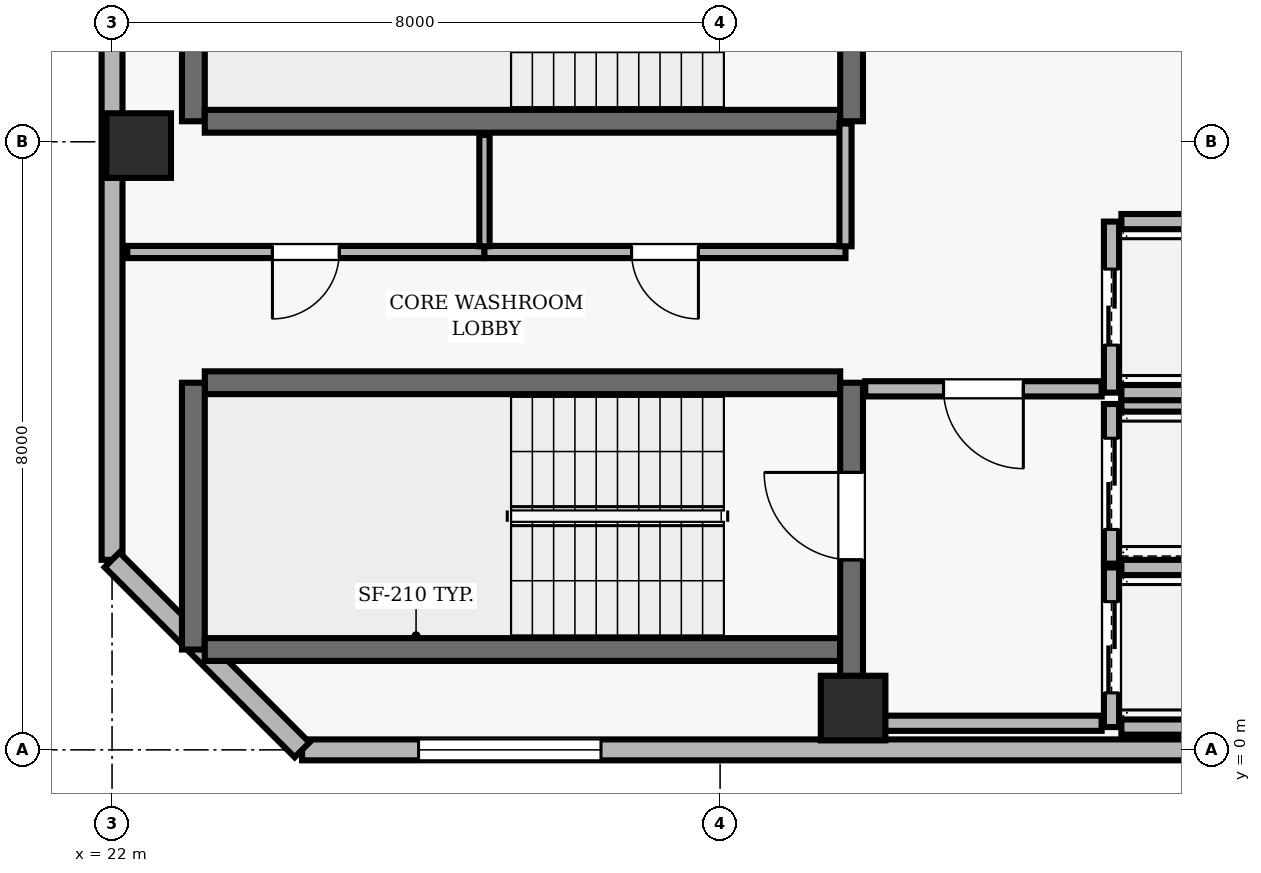
"""IFC4 building model, lengths in metres.
Left out: names, types, materials, properties, quantities, classifications, styles, units other than length and angle.
Written with IfcOpenShell. Run it as: python <this file> out.ifc"""

import sys

from ifc_helpers import new_model, si_unit, direction, frame, frame_2d, origin, origin_2d, place, context, subcontext, project, spatial, rectangle, extrude, element, fill, save


model = new_model("IFC4")
c1 = context("Model", 3, precision=1e-05, world=origin(), true_north=direction((0.0, 1.0)))
c2 = subcontext(c1, "Body", "Model", "MODEL_VIEW")
j1 = project(units=[si_unit("LENGTHUNIT", "METRE"), si_unit("PLANEANGLEUNIT", "RADIAN")], contexts=[c1])
p1 = place(None, origin())
s1 = spatial("IfcSite", under=j1, at=p1, CompositionType="ELEMENT")
p2 = place(p1, origin())
s2 = spatial("IfcBuilding", under=s1, at=p2, CompositionType="ELEMENT")
p3 = place(p2, frame((0.0, 0.0, 287.2)))
s3 = spatial("IfcBuildingStorey", under=s2, at=p3, CompositionType="ELEMENT", Elevation=287.2)
for number, where, z_axis, x_axis in (
    (1, (31.75, 0.55, 0.0), (0.0, 0.0, 1.0), (1.0, 0.0, 0.0)),
    (2, (22.35, 7.95, 0.0), (0.0, 0.0, 1.0), (1.0, 0.0, 0.0)),
):
    element("IfcColumn", number, at=place(p3, frame(where, z_axis=z_axis, x_axis=x_axis)), inside=s3, PredefinedType="COLUMN", context=c2, shape_type="SweptSolid", body=[
        extrude(rectangle(XDim=0.85, YDim=0.85, at=origin_2d()), origin(), (0.0, 0.0, 1.0), 3.9),
    ])
p4 = place(p3, frame((24.5, 0.0, 0.0), z_axis=(0.0, 0.0, 1.0), x_axis=(1.0, 0.0, 0.0)))
e3 = element("IfcWall", 3, at=p4, inside=s3, PredefinedType="SOLIDWALL", context=c2, shape_type="SweptSolid", body=[
    extrude(rectangle(XDim=32.8, YDim=0.275, at=frame_2d((16.4, 0.0))), origin(), (0.0, 0.0, 1.0), 3.69),
])
p5 = place(p4, frame((1.533, 0.0, 0.9)))
e4 = element("IfcOpeningElement", 4, at=p5, cuts=e3, PredefinedType="OPENING", context=c2, shape_type="SweptSolid", body=[
    extrude(rectangle(XDim=2.4, YDim=2.2, at=frame_2d((1.2, 1.1))), frame((0.0, 0.147, 0.0), z_axis=(0.0, -1.0, 0.0), x_axis=(1.0, 0.0, 0.0)), (0.0, 0.0, 1.0), 0.295),
])
p6 = place(p3, frame((22.0, 35.3, 0.0), z_axis=(0.0, 0.0, 1.0), x_axis=(0.0, -1.0, 0.0)))
e5 = element("IfcWall", 5, at=p6, inside=s3, PredefinedType="SOLIDWALL", context=c2, shape_type="SweptSolid", body=[
    extrude(rectangle(XDim=32.8, YDim=0.275, at=frame_2d((16.4, 0.0))), origin(), (0.0, 0.0, 1.0), 3.69),
])
p7 = place(p6, frame((7.3, 0.0, 0.0)))
e6 = element("IfcOpeningElement", 6, at=p7, cuts=e5, PredefinedType="OPENING", context=c2, shape_type="SweptSolid", body=[
    extrude(rectangle(XDim=1.0, YDim=2.2, at=frame_2d((0.5, 1.1))), frame((0.0, 0.147, 0.0), z_axis=(0.0, -1.0, 0.0), x_axis=(1.0, 0.0, 0.0)), (0.0, 0.0, 1.0), 0.295),
])
p8 = place(p6, frame((1.533, 0.0, 0.9)))
e7 = element("IfcOpeningElement", 7, at=p8, cuts=e5, PredefinedType="OPENING", context=c2, shape_type="SweptSolid", body=[
    extrude(rectangle(XDim=2.4, YDim=2.2, at=frame_2d((1.2, 1.1))), frame((0.0, 0.147, 0.0), z_axis=(0.0, -1.0, 0.0), x_axis=(1.0, 0.0, 0.0)), (0.0, 0.0, 1.0), 0.295),
])
p9 = place(p6, frame((12.917, 0.0, 0.9)))
e8 = element("IfcOpeningElement", 8, at=p9, cuts=e5, PredefinedType="OPENING", context=c2, shape_type="SweptSolid", body=[
    extrude(rectangle(XDim=2.4, YDim=2.2, at=frame_2d((1.2, 1.1))), frame((0.0, 0.147, 0.0), z_axis=(0.0, -1.0, 0.0), x_axis=(1.0, 0.0, 0.0)), (0.0, 0.0, 1.0), 0.295),
])
p10 = place(p6, frame((17.483, 0.0, 0.9)))
e9 = element("IfcOpeningElement", 9, at=p10, cuts=e5, PredefinedType="OPENING", context=c2, shape_type="SweptSolid", body=[
    extrude(rectangle(XDim=2.4, YDim=2.2, at=frame_2d((1.2, 1.1))), frame((0.0, 0.147, 0.0), z_axis=(0.0, -1.0, 0.0), x_axis=(1.0, 0.0, 0.0)), (0.0, 0.0, 1.0), 0.295),
])
p11 = place(p6, frame((23.4, 0.0, 0.9)))
e10 = element("IfcOpeningElement", 10, at=p11, cuts=e5, PredefinedType="OPENING", context=c2, shape_type="SweptSolid", body=[
    extrude(rectangle(XDim=2.4, YDim=2.2, at=frame_2d((1.2, 1.1))), frame((0.0, 0.147, 0.0), z_axis=(0.0, -1.0, 0.0), x_axis=(1.0, 0.0, 0.0)), (0.0, 0.0, 1.0), 0.295),
])
p12 = place(p3, frame((22.0, 2.5, 0.0), z_axis=(0.0, 0.0, 1.0), x_axis=(0.707106781187, -0.707106781187, 0.0)))
e11 = element("IfcWall", 11, at=p12, inside=s3, PredefinedType="SOLIDWALL", context=c2, shape_type="SweptSolid", body=[
    extrude(rectangle(XDim=3.536, YDim=0.275, at=frame_2d((1.768, 0.0))), origin(), (0.0, 0.0, 1.0), 3.69),
])
p13 = place(p3, frame((31.58, 4.83, 0.0), z_axis=(0.0, 0.0, 1.0), x_axis=(-1.0, 0.0, 0.0)))
e12 = element("IfcWall", 12, at=p13, inside=s3, PredefinedType="SHEAR", context=c2, shape_type="SweptSolid", body=[
    extrude(rectangle(XDim=8.36, YDim=0.3, at=frame_2d((4.18, 0.0))), origin(), (0.0, 0.0, 1.0), 3.69),
])
p14 = place(p3, frame((23.07, 4.83, 0.0), z_axis=(0.0, 0.0, 1.0), x_axis=(0.0, -1.0, 0.0)))
e13 = element("IfcWall", 13, at=p14, inside=s3, PredefinedType="SHEAR", context=c2, shape_type="SweptSolid", body=[
    extrude(rectangle(XDim=3.51, YDim=0.3, at=frame_2d((1.755, 0.0))), origin(), (0.0, 0.0, 1.0), 3.69),
])
p15 = place(p3, frame((23.22, 1.32, 0.0), z_axis=(0.0, 0.0, 1.0), x_axis=(1.0, 0.0, 0.0)))
e14 = element("IfcWall", 14, at=p15, inside=s3, PredefinedType="SHEAR", context=c2, shape_type="SweptSolid", body=[
    extrude(rectangle(XDim=8.36, YDim=0.3, at=frame_2d((4.18, 0.0))), origin(), (0.0, 0.0, 1.0), 3.69),
])
p16 = place(p3, frame((31.73, 0.96, 0.0), z_axis=(0.0, 0.0, 1.0), x_axis=(0.0, 1.0, 0.0)))
e15 = element("IfcWall", 15, at=p16, inside=s3, PredefinedType="SHEAR", context=c2, shape_type="SweptSolid", body=[
    extrude(rectangle(XDim=3.87, YDim=0.3, at=frame_2d((1.935, 0.0))), origin(), (0.0, 0.0, 1.0), 3.69),
])
p17 = place(p16, frame((1.54, 0.0, 0.0)))
e16 = element("IfcOpeningElement", 16, at=p17, cuts=e15, PredefinedType="OPENING", context=c2, shape_type="SweptSolid", body=[
    extrude(rectangle(XDim=1.15, YDim=2.15, at=frame_2d((0.575, 1.075))), frame((0.0, 0.16, 0.0), z_axis=(0.0, -1.0, 0.0), x_axis=(1.0, 0.0, 0.0)), (0.0, 0.0, 1.0), 0.32),
])
p18 = place(p3, frame((23.07, 11.78, 0.0), z_axis=(0.0, 0.0, 1.0), x_axis=(0.0, -1.0, 0.0)))
e17 = element("IfcWall", 17, at=p18, inside=s3, PredefinedType="SHEAR", context=c2, shape_type="SweptSolid", body=[
    extrude(rectangle(XDim=3.51, YDim=0.3, at=frame_2d((1.755, 0.0))), origin(), (0.0, 0.0, 1.0), 3.69),
])
p19 = place(p3, frame((23.22, 8.27, 0.0), z_axis=(0.0, 0.0, 1.0), x_axis=(1.0, 0.0, 0.0)))
e18 = element("IfcWall", 18, at=p19, inside=s3, PredefinedType="SHEAR", context=c2, shape_type="SweptSolid", body=[
    extrude(rectangle(XDim=8.36, YDim=0.3, at=frame_2d((4.18, 0.0))), origin(), (0.0, 0.0, 1.0), 3.69),
])
p20 = place(p3, frame((31.73, 8.27, 0.0), z_axis=(0.0, 0.0, 1.0), x_axis=(0.0, 1.0, 0.0)))
e19 = element("IfcWall", 19, at=p20, inside=s3, PredefinedType="SHEAR", context=c2, shape_type="SweptSolid", body=[
    extrude(rectangle(XDim=3.51, YDim=0.3, at=frame_2d((1.755, 0.0))), origin(), (0.0, 0.0, 1.0), 3.69),
])
p21 = place(p20, frame((1.18, 0.0, 0.0)))
e20 = element("IfcOpeningElement", 20, at=p21, cuts=e19, PredefinedType="OPENING", context=c2, shape_type="SweptSolid", body=[
    extrude(rectangle(XDim=1.15, YDim=2.15, at=frame_2d((0.575, 1.075))), frame((0.0, 0.16, 0.0), z_axis=(0.0, -1.0, 0.0), x_axis=(1.0, 0.0, 0.0)), (0.0, 0.0, 1.0), 0.32),
])
p22 = place(p3, frame((35.15, 2.4, 0.0), z_axis=(0.0, 0.0, 1.0), x_axis=(0.0, -1.0, 0.0)))
e21 = element("IfcWall", 21, at=p22, inside=s3, PredefinedType="SOLIDWALL", context=c2, shape_type="SweptSolid", body=[
    extrude(rectangle(XDim=2.1, YDim=0.2, at=frame_2d((1.05, 0.0))), origin(), (0.0, 0.0, 1.0), 3.69),
])
p23 = place(p22, frame((0.45, 0.0, 0.0)))
e22 = element("IfcOpeningElement", 22, at=p23, cuts=e21, PredefinedType="OPENING", context=c2, shape_type="SweptSolid", body=[
    extrude(rectangle(XDim=1.2, YDim=2.15, at=frame_2d((0.6, 1.075))), frame((0.0, 0.11, 0.0), z_axis=(0.0, -1.0, 0.0), x_axis=(1.0, 0.0, 0.0)), (0.0, 0.0, 1.0), 0.22),
])
for number, where, z_axis, x_axis in (
    (23, (35.28, 0.3, 0.0), (0.0, 0.0, 1.0), (1.0, 0.0, 0.0)),
    (24, (37.42, 2.4, 0.0), (0.0, 0.0, 1.0), (-1.0, 0.0, 0.0)),
):
    element("IfcWall", number, at=place(p3, frame(where, z_axis=z_axis, x_axis=x_axis)), inside=s3, PredefinedType="SOLIDWALL", context=c2, shape_type="SweptSolid", body=[
        extrude(rectangle(XDim=2.14, YDim=0.2, at=frame_2d((1.07, 0.0))), origin(), (0.0, 0.0, 1.0), 3.69),
    ])
p24 = place(p3, frame((35.15, 4.55, 0.0), z_axis=(0.0, 0.0, 1.0), x_axis=(0.0, -1.0, 0.0)))
e25 = element("IfcWall", 25, at=p24, inside=s3, PredefinedType="SOLIDWALL", context=c2, shape_type="SweptSolid", body=[
    extrude(rectangle(XDim=2.1, YDim=0.2, at=frame_2d((1.05, 0.0))), origin(), (0.0, 0.0, 1.0), 3.69),
])
p25 = place(p24, frame((0.45, 0.0, 0.0)))
e26 = element("IfcOpeningElement", 26, at=p25, cuts=e25, PredefinedType="OPENING", context=c2, shape_type="SweptSolid", body=[
    extrude(rectangle(XDim=1.2, YDim=2.15, at=frame_2d((0.6, 1.075))), frame((0.0, 0.11, 0.0), z_axis=(0.0, -1.0, 0.0), x_axis=(1.0, 0.0, 0.0)), (0.0, 0.0, 1.0), 0.22),
])
p26 = place(p3, frame((37.42, 4.55, 0.0), z_axis=(0.0, 0.0, 1.0), x_axis=(-1.0, 0.0, 0.0)))
e27 = element("IfcWall", 27, at=p26, inside=s3, PredefinedType="SOLIDWALL", context=c2, shape_type="SweptSolid", body=[
    extrude(rectangle(XDim=2.14, YDim=0.2, at=frame_2d((1.07, 0.0))), origin(), (0.0, 0.0, 1.0), 3.69),
])
p27 = place(p3, frame((35.15, 6.95, 0.0), z_axis=(0.0, 0.0, 1.0), x_axis=(0.0, -1.0, 0.0)))
e28 = element("IfcWall", 28, at=p27, inside=s3, PredefinedType="SOLIDWALL", context=c2, shape_type="SweptSolid", body=[
    extrude(rectangle(XDim=2.25, YDim=0.2, at=frame_2d((1.125, 0.0))), origin(), (0.0, 0.0, 1.0), 3.69),
])
p28 = place(p27, frame((0.625, 0.0, 0.0)))
e29 = element("IfcOpeningElement", 29, at=p28, cuts=e28, PredefinedType="OPENING", context=c2, shape_type="SweptSolid", body=[
    extrude(rectangle(XDim=1.0, YDim=2.1, at=frame_2d((0.5, 1.05))), frame((0.0, 0.11, 0.0), z_axis=(0.0, -1.0, 0.0), x_axis=(1.0, 0.0, 0.0)), (0.0, 0.0, 1.0), 0.22),
])
for number, where, z_axis, x_axis in (
    (30, (35.28, 4.7, 0.0), (0.0, 0.0, 1.0), (1.0, 0.0, 0.0)),
    (31, (37.42, 6.95, 0.0), (0.0, 0.0, 1.0), (-1.0, 0.0, 0.0)),
):
    element("IfcWall", number, at=place(p3, frame(where, z_axis=z_axis, x_axis=x_axis)), inside=s3, PredefinedType="SOLIDWALL", context=c2, shape_type="SweptSolid", body=[
        extrude(rectangle(XDim=2.14, YDim=0.2, at=frame_2d((1.07, 0.0))), origin(), (0.0, 0.0, 1.0), 3.69),
    ])
p29 = place(p3, frame((26.9, 6.55, 0.0), z_axis=(0.0, 0.0, 1.0), x_axis=(-1.0, 0.0, 0.0)))
e32 = element("IfcWall", 32, at=p29, inside=s3, PredefinedType="PARTITIONING", context=c2, shape_type="SweptSolid", body=[
    extrude(rectangle(XDim=4.7, YDim=0.16, at=frame_2d((2.35, 0.0))), origin(), (0.0, 0.0, 1.0), 3.69),
])
p30 = place(p29, frame((1.91, 0.0, 0.0)))
e33 = element("IfcOpeningElement", 33, at=p30, cuts=e32, PredefinedType="OPENING", context=c2, shape_type="SweptSolid", body=[
    extrude(rectangle(XDim=0.88, YDim=2.1, at=frame_2d((0.44, 1.05))), frame((0.0, 0.09, 0.0), z_axis=(0.0, -1.0, 0.0), x_axis=(1.0, 0.0, 0.0)), (0.0, 0.0, 1.0), 0.18),
])
p31 = place(p3, frame((31.65, 0.35, 0.0), z_axis=(0.0, 0.0, 1.0), x_axis=(1.0, 0.0, 0.0)))
e34 = element("IfcWall", 34, at=p31, inside=s3, PredefinedType="SOLIDWALL", context=c2, shape_type="SweptSolid", body=[
    extrude(rectangle(XDim=3.37, YDim=0.2, at=frame_2d((1.685, 0.0))), origin(), (0.0, 0.0, 1.0), 3.69),
])
p32 = place(p3, frame((31.65, 6.55, 0.0), z_axis=(0.0, 0.0, 1.0), x_axis=(-1.0, 0.0, 0.0)))
e35 = element("IfcWall", 35, at=p32, inside=s3, PredefinedType="PARTITIONING", context=c2, shape_type="SweptSolid", body=[
    extrude(rectangle(XDim=4.75, YDim=0.16, at=frame_2d((2.375, 0.0))), origin(), (0.0, 0.0, 1.0), 3.69),
])
p33 = place(p32, frame((1.935, 0.0, 0.0)))
e36 = element("IfcOpeningElement", 36, at=p33, cuts=e35, PredefinedType="OPENING", context=c2, shape_type="SweptSolid", body=[
    extrude(rectangle(XDim=0.88, YDim=2.1, at=frame_2d((0.44, 1.05))), frame((0.0, 0.09, 0.0), z_axis=(0.0, -1.0, 0.0), x_axis=(1.0, 0.0, 0.0)), (0.0, 0.0, 1.0), 0.18),
])
p34 = place(p3, frame((35.02, 4.75, 0.0), z_axis=(0.0, 0.0, 1.0), x_axis=(-1.0, 0.0, 0.0)))
e37 = element("IfcWall", 37, at=p34, inside=s3, PredefinedType="SOLIDWALL", context=c2, shape_type="SweptSolid", body=[
    extrude(rectangle(XDim=3.11, YDim=0.2, at=frame_2d((1.555, 0.0))), origin(), (0.0, 0.0, 1.0), 3.69),
])
p35 = place(p34, frame((1.03, 0.0, 0.0)))
e38 = element("IfcOpeningElement", 38, at=p35, cuts=e37, PredefinedType="OPENING", context=c2, shape_type="SweptSolid", body=[
    extrude(rectangle(XDim=1.05, YDim=2.15, at=frame_2d((0.525, 1.075))), frame((0.0, 0.11, 0.0), z_axis=(0.0, -1.0, 0.0), x_axis=(1.0, 0.0, 0.0)), (0.0, 0.0, 1.0), 0.22),
])
p36 = place(p3, frame((26.9, 6.625, 0.0), z_axis=(0.0, 0.0, 1.0), x_axis=(0.0, 1.0, 0.0)))
e39 = element("IfcWall", 39, at=p36, inside=s3, PredefinedType="PARTITIONING", context=c2, shape_type="SweptSolid", body=[
    extrude(rectangle(XDim=1.465, YDim=0.135, at=frame_2d((0.732, 0.0))), origin(), (0.0, 0.0, 1.0), 3.69),
])
p37 = place(p3, frame((31.65, 8.24, 0.0), z_axis=(0.0, 0.0, 1.0), x_axis=(0.0, -1.0, 0.0)))
e40 = element("IfcWall", 40, at=p37, inside=s3, PredefinedType="PARTITIONING", context=c2, shape_type="SweptSolid", body=[
    extrude(rectangle(XDim=1.615, YDim=0.16, at=frame_2d((0.808, 0.0))), origin(), (0.0, 0.0, 1.0), 3.69),
])
p38 = place(p5, origin())
e41 = element("IfcWindow", 41, at=p38, inside=s3, PartitioningType="SINGLE_PANEL", PredefinedType="WINDOW", context=c2, shape_type="SweptSolid", body=[
    extrude(rectangle(XDim=2.4, YDim=2.2, at=frame_2d((1.2, 1.1))), frame((0.0, 0.03, 0.0), z_axis=(0.0, -1.0, 0.0), x_axis=(1.0, 0.0, 0.0)), (0.0, 0.0, 1.0), 0.06),
])
fill(e4, e41)
p39 = place(p17, origin())
e42 = element("IfcDoor", 42, at=p39, inside=s3, OperationType="SINGLE_SWING_RIGHT", PredefinedType="DOOR", context=c2, shape_type="SweptSolid", body=[
    extrude(rectangle(XDim=1.15, YDim=2.15, at=frame_2d((0.575, 1.075))), frame((0.0, 0.025, 0.0), z_axis=(0.0, -1.0, 0.0), x_axis=(1.0, 0.0, 0.0)), (0.0, 0.0, 1.0), 0.05),
])
fill(e16, e42)
p40 = place(p23, origin())
e43 = element("IfcDoor", 43, at=p40, inside=s3, OperationType="DOUBLE_DOOR_SLIDING", PredefinedType="DOOR", context=c2, shape_type="SweptSolid", body=[
    extrude(rectangle(XDim=1.2, YDim=2.15, at=frame_2d((0.6, 1.075))), frame((0.0, 0.025, 0.0), z_axis=(0.0, -1.0, 0.0), x_axis=(1.0, 0.0, 0.0)), (0.0, 0.0, 1.0), 0.05),
])
fill(e22, e43)
p41 = place(p25, origin())
e44 = element("IfcDoor", 44, at=p41, inside=s3, OperationType="DOUBLE_DOOR_SLIDING", PredefinedType="DOOR", context=c2, shape_type="SweptSolid", body=[
    extrude(rectangle(XDim=1.2, YDim=2.15, at=frame_2d((0.6, 1.075))), frame((0.0, 0.025, 0.0), z_axis=(0.0, -1.0, 0.0), x_axis=(1.0, 0.0, 0.0)), (0.0, 0.0, 1.0), 0.05),
])
fill(e26, e44)
p42 = place(p28, origin())
e45 = element("IfcDoor", 45, at=p42, inside=s3, OperationType="DOUBLE_DOOR_SLIDING", PredefinedType="DOOR", context=c2, shape_type="SweptSolid", body=[
    extrude(rectangle(XDim=1.0, YDim=2.1, at=frame_2d((0.5, 1.05))), frame((0.0, 0.025, 0.0), z_axis=(0.0, -1.0, 0.0), x_axis=(1.0, 0.0, 0.0)), (0.0, 0.0, 1.0), 0.05),
])
fill(e29, e45)
p43 = place(p35, origin())
e46 = element("IfcDoor", 46, at=p43, inside=s3, OperationType="SINGLE_SWING_LEFT", PredefinedType="DOOR", context=c2, shape_type="SweptSolid", body=[
    extrude(rectangle(XDim=1.05, YDim=2.15, at=frame_2d((0.525, 1.075))), frame((0.0, 0.025, 0.0), z_axis=(0.0, -1.0, 0.0), x_axis=(1.0, 0.0, 0.0)), (0.0, 0.0, 1.0), 0.05),
])
fill(e38, e46)
p44 = place(p30, origin())
e47 = element("IfcDoor", 47, at=p44, inside=s3, OperationType="SINGLE_SWING_RIGHT", PredefinedType="DOOR", context=c2, shape_type="SweptSolid", body=[
    extrude(rectangle(XDim=0.88, YDim=2.1, at=frame_2d((0.44, 1.05))), frame((0.0, 0.025, 0.0), z_axis=(0.0, -1.0, 0.0), x_axis=(1.0, 0.0, 0.0)), (0.0, 0.0, 1.0), 0.05),
])
fill(e33, e47)
p45 = place(p33, origin())
e48 = element("IfcDoor", 48, at=p45, inside=s3, OperationType="SINGLE_SWING_LEFT", PredefinedType="DOOR", context=c2, shape_type="SweptSolid", body=[
    extrude(rectangle(XDim=0.88, YDim=2.1, at=frame_2d((0.44, 1.05))), frame((0.0, 0.025, 0.0), z_axis=(0.0, -1.0, 0.0), x_axis=(1.0, 0.0, 0.0)), (0.0, 0.0, 1.0), 0.05),
])
fill(e36, e48)
save(model, sys.argv[1])
